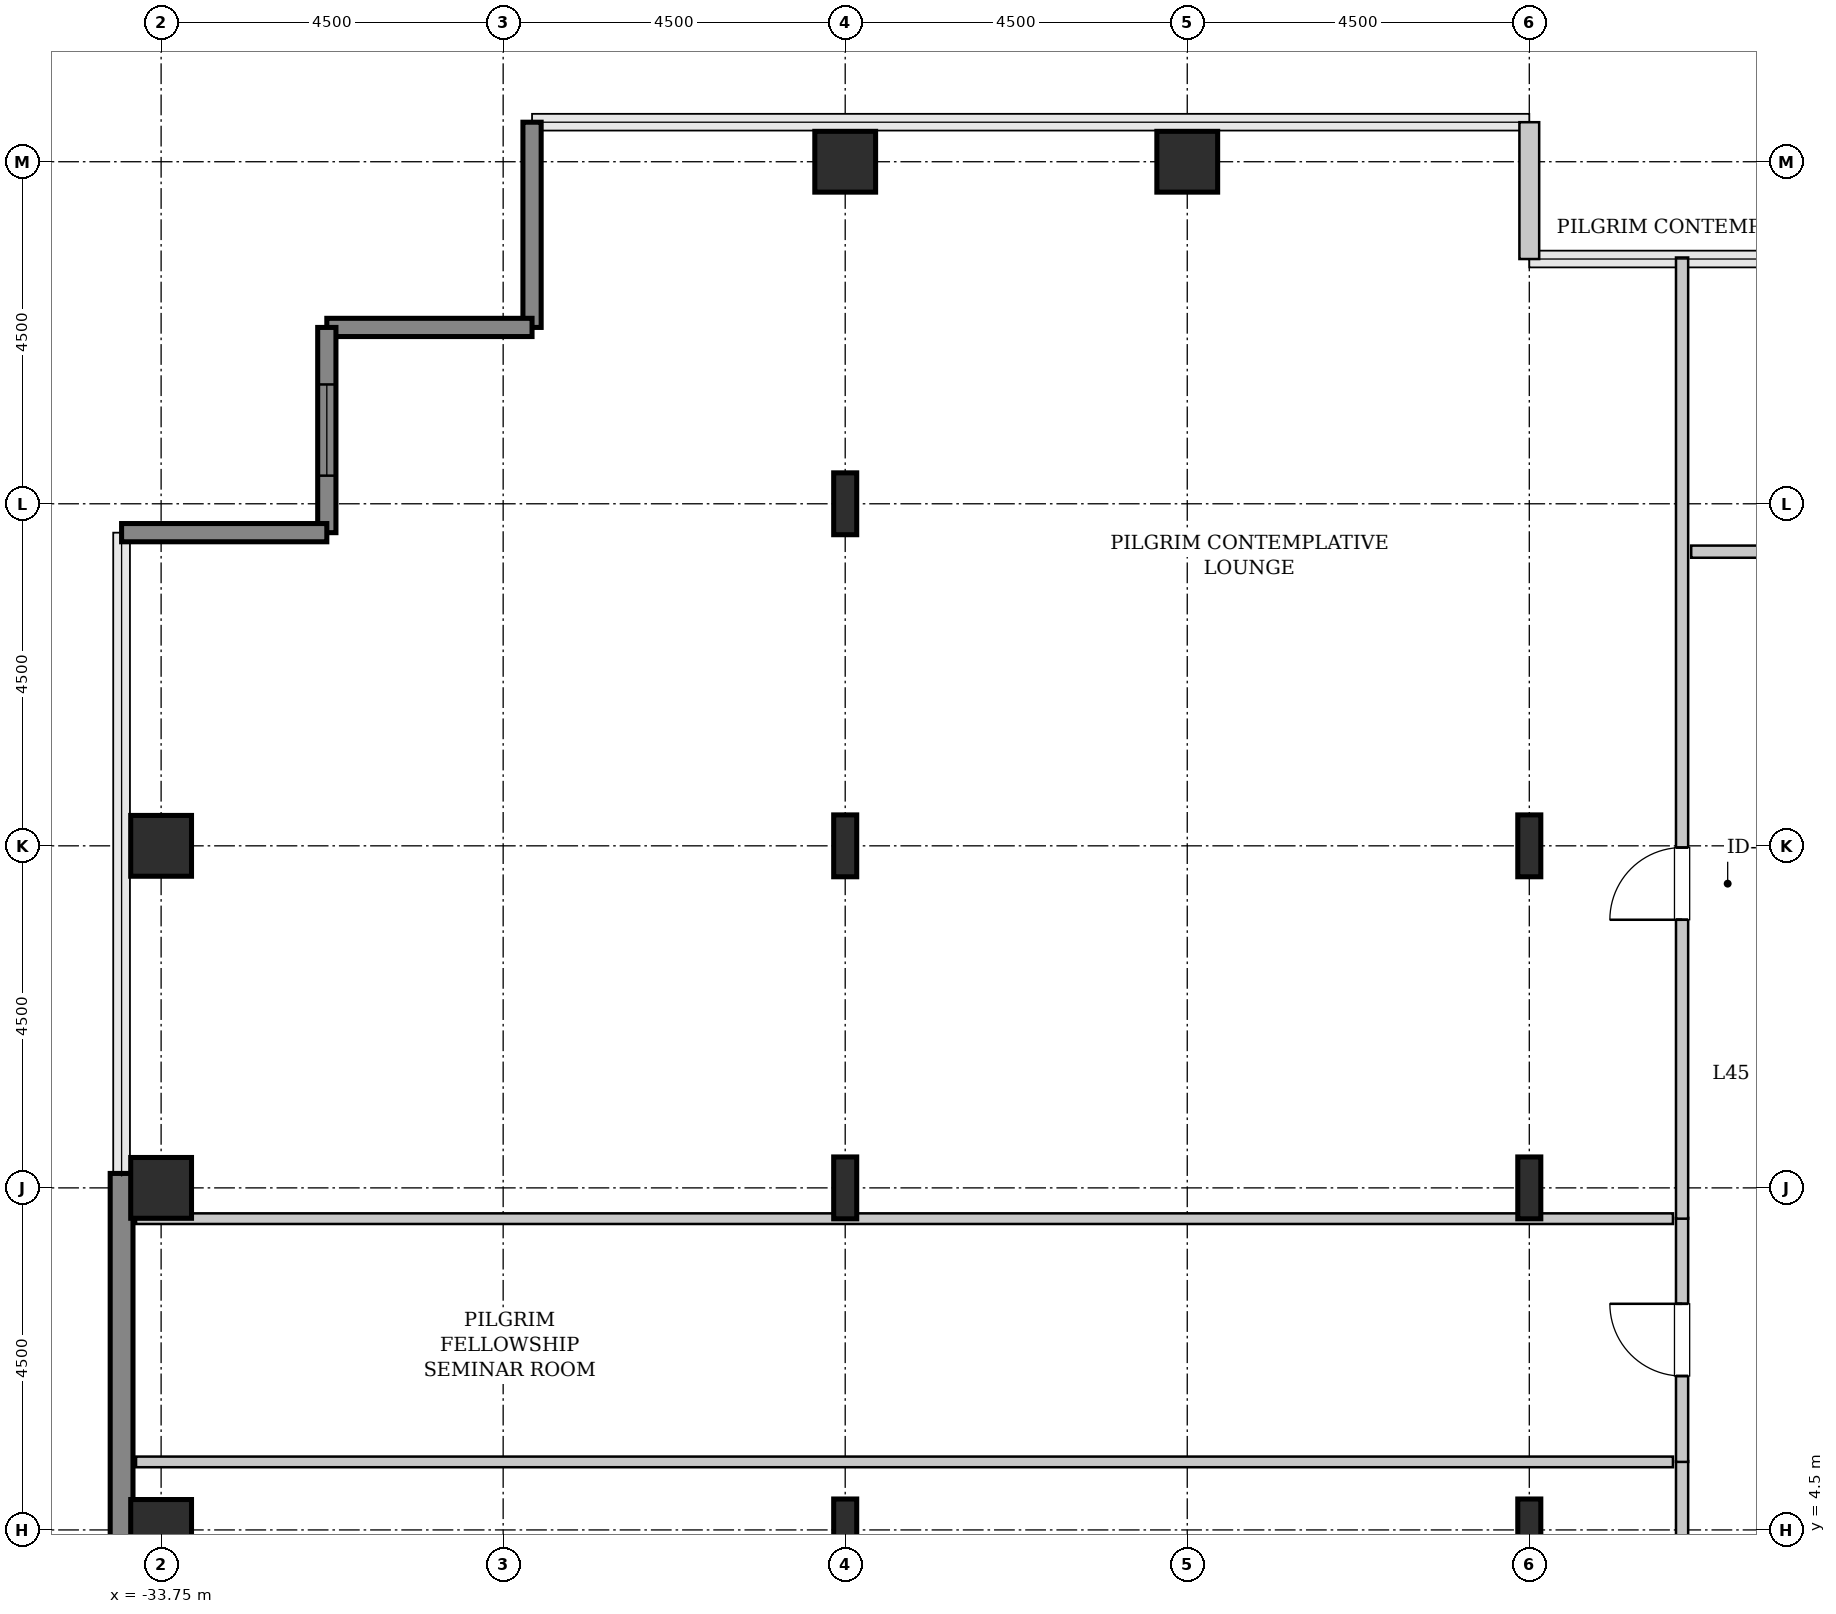
"""IFC4 building model, lengths in metres.
Left out: names, types, materials, properties, quantities, classifications, styles, units other than length and angle.
Written with IfcOpenShell. Run it as: python <this file> out.ifc"""

import sys

from ifc_helpers import new_model, si_unit, direction, frame, frame_2d, origin, origin_2d, place, context, subcontext, project, spatial, rectangle, hollow_rectangle, i_section, extrude, source, transform, mapped, element, fill, save


model = new_model("IFC4")
c1 = context("Model", 3, precision=1e-05, world=origin(), true_north=direction((0.0, 1.0)))
c2 = subcontext(c1, "Body", "Model", "MODEL_VIEW")
j1 = project(units=[si_unit("LENGTHUNIT", "METRE"), si_unit("PLANEANGLEUNIT", "RADIAN")], contexts=[c1])
p1 = place(None, origin())
s1 = spatial("IfcSite", under=j1, at=p1, CompositionType="ELEMENT")
p2 = place(p1, origin())
s2 = spatial("IfcBuilding", under=s1, at=p2, CompositionType="ELEMENT")
p3 = place(p2, frame((0.0, 0.0, 183.0)))
s3 = spatial("IfcBuildingStorey", under=s2, at=p3, CompositionType="ELEMENT", Elevation=183.0)
m1 = source(origin(), c2, "Body", "SweptSolid", [
    extrude(hollow_rectangle(XDim=0.8, YDim=0.8, WallThickness=0.04, InnerFilletRadius=0.04, OuterFilletRadius=0.08, at=origin_2d()), origin(), (0.0, 0.0, 1.0), 3.8),
])
for number, where, z_axis, x_axis in (
    (1, (-33.75, 4.5, 0.0), (0.0, 0.0, 1.0), (1.0, 0.0, 0.0)),
    (2, (-33.75, 9.0, 0.0), (0.0, 0.0, 1.0), (1.0, 0.0, 0.0)),
    (3, (-33.75, 13.5, 0.0), (0.0, 0.0, 1.0), (1.0, 0.0, 0.0)),
):
    element("IfcColumn", number, at=place(p3, frame(where, z_axis=z_axis, x_axis=x_axis)), inside=s3, PredefinedType="COLUMN", context=c2, shape_type="MappedRepresentation", body=[
        mapped(m1, transform((0.0, 0.0, 0.0), x_axis=(1.0, 0.0, 0.0), y_axis=(0.0, 1.0, 0.0), z_axis=(0.0, 0.0, 1.0), scale=1.0)),
    ])
m2 = source(origin(), c2, "Body", "SweptSolid", [
    extrude(i_section(OverallWidth=0.303, OverallDepth=0.814, WebThickness=0.021, FlangeThickness=0.04, FilletRadius=0.03, at=origin_2d()), origin(), (0.0, 0.0, 1.0), 3.8),
])
for number, where, z_axis, x_axis in (
    (4, (-24.75, 4.5, 0.0), (0.0, 0.0, 1.0), (1.0, 0.0, 0.0)),
    (5, (-24.75, 9.0, 0.0), (0.0, 0.0, 1.0), (1.0, 0.0, 0.0)),
    (6, (-24.75, 13.5, 0.0), (0.0, 0.0, 1.0), (1.0, 0.0, 0.0)),
    (7, (-24.75, 18.0, 0.0), (0.0, 0.0, 1.0), (1.0, 0.0, 0.0)),
):
    element("IfcColumn", number, at=place(p3, frame(where, z_axis=z_axis, x_axis=x_axis)), inside=s3, PredefinedType="COLUMN", context=c2, shape_type="MappedRepresentation", body=[
        mapped(m2, transform((0.0, 0.0, 0.0), x_axis=(1.0, 0.0, 0.0), y_axis=(0.0, 1.0, 0.0), z_axis=(0.0, 0.0, 1.0), scale=1.0)),
    ])
for number, where, z_axis, x_axis in (
    (8, (-24.75, 22.5, 0.0), (0.0, 0.0, 1.0), (1.0, 0.0, 0.0)),
    (9, (-20.25, 22.5, 0.0), (0.0, 0.0, 1.0), (1.0, 0.0, 0.0)),
):
    element("IfcColumn", number, at=place(p3, frame(where, z_axis=z_axis, x_axis=x_axis)), inside=s3, PredefinedType="COLUMN", context=c2, shape_type="MappedRepresentation", body=[
        mapped(m1, transform((0.0, 0.0, 0.0), x_axis=(1.0, 0.0, 0.0), y_axis=(0.0, 1.0, 0.0), z_axis=(0.0, 0.0, 1.0), scale=1.0)),
    ])
for number, where, z_axis, x_axis in (
    (10, (-15.75, 4.5, 0.0), (0.0, 0.0, 1.0), (1.0, 0.0, 0.0)),
    (11, (-15.75, 9.0, 0.0), (0.0, 0.0, 1.0), (1.0, 0.0, 0.0)),
    (12, (-15.75, 13.5, 0.0), (0.0, 0.0, 1.0), (1.0, 0.0, 0.0)),
):
    element("IfcColumn", number, at=place(p3, frame(where, z_axis=z_axis, x_axis=x_axis)), inside=s3, PredefinedType="COLUMN", context=c2, shape_type="MappedRepresentation", body=[
        mapped(m2, transform((0.0, 0.0, 0.0), x_axis=(1.0, 0.0, 0.0), y_axis=(0.0, 1.0, 0.0), z_axis=(0.0, 0.0, 1.0), scale=1.0)),
    ])
m3 = source(origin(), c2, "Body", "SweptSolid", [
    extrude(rectangle(XDim=4.88, YDim=0.3, at=frame_2d((2.44, 0.0))), origin(), (0.0, 0.0, 1.0), 3.55),
])
p4 = place(p3, frame((-34.27, 4.31, 0.0), z_axis=(0.0, 0.0, 1.0), x_axis=(0.0, 1.0, 0.0)))
e13 = element("IfcWall", 13, at=p4, inside=s3, PredefinedType="SHEAR", context=c2, shape_type="MappedRepresentation", body=[
    mapped(m3, transform((0.0, 0.0, 0.0), x_axis=(1.0, 0.0, 0.0), y_axis=(0.0, 1.0, 0.0), z_axis=(0.0, 0.0, 1.0), scale=1.0)),
])
m4 = source(origin(), c2, "Body", "SweptSolid", [
    extrude(rectangle(XDim=1.8, YDim=0.26, at=frame_2d((0.9, 0.0))), origin(), (0.0, 0.0, 1.0), 3.55),
])
p5 = place(p3, frame((-15.75, 21.22, 0.0), z_axis=(0.0, 0.0, 1.0), x_axis=(0.0, 1.0, 0.0)))
e14 = element("IfcWall", 14, at=p5, inside=s3, PredefinedType="SOLIDWALL", context=c2, shape_type="MappedRepresentation", body=[
    mapped(m4, transform((0.0, 0.0, 0.0), x_axis=(1.0, 0.0, 0.0), y_axis=(0.0, 1.0, 0.0), z_axis=(0.0, 0.0, 1.0), scale=1.0)),
])
m5 = source(origin(), c2, "Body", "SweptSolid", [
    extrude(rectangle(XDim=2.7, YDim=0.24, at=frame_2d((1.35, 0.0))), origin(), (0.0, 0.0, 1.0), 3.55),
])
for number, where, z_axis, x_axis in (
    (15, (-28.87, 23.02, 0.0), (0.0, 0.0, 1.0), (0.0, -1.0, 0.0)),
    (16, (-28.87, 20.32, 0.0), (0.0, 0.0, 1.0), (-1.0, 0.0, 0.0)),
):
    element("IfcWall", number, at=place(p3, frame(where, z_axis=z_axis, x_axis=x_axis)), inside=s3, PredefinedType="SHEAR", context=c2, shape_type="MappedRepresentation", body=[
        mapped(m5, transform((0.0, 0.0, 0.0), x_axis=(1.0, 0.0, 0.0), y_axis=(0.0, 1.0, 0.0), z_axis=(0.0, 0.0, 1.0), scale=1.0)),
    ])
p6 = place(p3, frame((-31.57, 20.32, 0.0), z_axis=(0.0, 0.0, 1.0), x_axis=(0.0, -1.0, 0.0)))
e17 = element("IfcWall", 17, at=p6, inside=s3, PredefinedType="SHEAR", context=c2, shape_type="MappedRepresentation", body=[
    mapped(m5, transform((0.0, 0.0, 0.0), x_axis=(1.0, 0.0, 0.0), y_axis=(0.0, 1.0, 0.0), z_axis=(0.0, 0.0, 1.0), scale=1.0)),
])
p7 = place(p6, frame((0.75, 0.0, 0.85)))
e18 = element("IfcOpeningElement", 18, at=p7, cuts=e17, PredefinedType="OPENING", context=c2, shape_type="SweptSolid", body=[
    extrude(rectangle(XDim=1.2, YDim=1.8, at=frame_2d((0.6, 0.9))), frame((0.0, 0.13, 0.0), z_axis=(0.0, -1.0, 0.0), x_axis=(1.0, 0.0, 0.0)), (0.0, 0.0, 1.0), 0.26),
])
p8 = place(p3, frame((-31.57, 17.62, 0.0), z_axis=(0.0, 0.0, 1.0), x_axis=(-1.0, 0.0, 0.0)))
e19 = element("IfcWall", 19, at=p8, inside=s3, PredefinedType="SHEAR", context=c2, shape_type="MappedRepresentation", body=[
    mapped(m5, transform((0.0, 0.0, 0.0), x_axis=(1.0, 0.0, 0.0), y_axis=(0.0, 1.0, 0.0), z_axis=(0.0, 0.0, 1.0), scale=1.0)),
])
m6 = source(origin(), c2, "Body", "SweptSolid", [
    extrude(rectangle(XDim=5.41, YDim=0.16, at=frame_2d((2.705, 0.0))), origin(), (0.0, 0.0, 1.0), 3.535),
])
p9 = place(p3, frame((-13.74, -0.005, 0.0), z_axis=(0.0, 0.0, 1.0), x_axis=(0.0, 1.0, 0.0)))
e20 = element("IfcWall", 20, at=p9, inside=s3, PredefinedType="PARTITIONING", context=c2, shape_type="MappedRepresentation", body=[
    mapped(m6, transform((0.0, 0.0, 0.0), x_axis=(1.0, 0.0, 0.0), y_axis=(0.0, 1.0, 0.0), z_axis=(0.0, 0.0, 1.0), scale=1.0)),
])
p10 = place(p9, frame((2.23, 0.0, 0.0)))
e21 = element("IfcOpeningElement", 21, at=p10, cuts=e20, PredefinedType="OPENING", context=c2, shape_type="SweptSolid", body=[
    extrude(rectangle(XDim=0.95, YDim=2.1, at=frame_2d((0.475, 1.05))), frame((0.0, 0.09, 0.0), z_axis=(0.0, -1.0, 0.0), x_axis=(1.0, 0.0, 0.0)), (0.0, 0.0, 1.0), 0.18),
])
m7 = source(origin(), c2, "Body", "SweptSolid", [
    extrude(rectangle(XDim=20.22, YDim=0.14, at=frame_2d((10.11, 0.0))), origin(), (0.0, 0.0, 1.0), 3.535),
])
p11 = place(p3, frame((-34.08, 5.395, 0.0), z_axis=(0.0, 0.0, 1.0), x_axis=(1.0, 0.0, 0.0)))
e22 = element("IfcWall", 22, at=p11, inside=s3, PredefinedType="PARTITIONING", context=c2, shape_type="MappedRepresentation", body=[
    mapped(m7, transform((0.0, 0.0, 0.0), x_axis=(1.0, 0.0, 0.0), y_axis=(0.0, 1.0, 0.0), z_axis=(0.0, 0.0, 1.0), scale=1.0)),
])
m8 = source(origin(), c2, "Body", "SweptSolid", [
    extrude(rectangle(XDim=3.21, YDim=0.16, at=frame_2d((1.605, 0.0))), origin(), (0.0, 0.0, 1.0), 3.535),
])
p12 = place(p3, frame((-13.74, 5.395, 0.0), z_axis=(0.0, 0.0, 1.0), x_axis=(0.0, 1.0, 0.0)))
e23 = element("IfcWall", 23, at=p12, inside=s3, PredefinedType="PARTITIONING", context=c2, shape_type="MappedRepresentation", body=[
    mapped(m8, transform((0.0, 0.0, 0.0), x_axis=(1.0, 0.0, 0.0), y_axis=(0.0, 1.0, 0.0), z_axis=(0.0, 0.0, 1.0), scale=1.0)),
])
p13 = place(p12, frame((1.13, 0.0, 0.0)))
e24 = element("IfcOpeningElement", 24, at=p13, cuts=e23, PredefinedType="OPENING", context=c2, shape_type="SweptSolid", body=[
    extrude(rectangle(XDim=0.95, YDim=2.1, at=frame_2d((0.475, 1.05))), frame((0.0, 0.09, 0.0), z_axis=(0.0, -1.0, 0.0), x_axis=(1.0, 0.0, 0.0)), (0.0, 0.0, 1.0), 0.18),
])
m9 = source(origin(), c2, "Body", "SweptSolid", [
    extrude(rectangle(XDim=20.22, YDim=0.14, at=frame_2d((10.11, 0.0))), origin(), (0.0, 0.0, 1.0), 2.875),
])
p14 = place(p3, frame((-34.08, 8.595, 0.0), z_axis=(0.0, 0.0, 1.0), x_axis=(1.0, 0.0, 0.0)))
e25 = element("IfcWall", 25, at=p14, inside=s3, PredefinedType="PARTITIONING", context=c2, shape_type="MappedRepresentation", body=[
    mapped(m9, transform((0.0, 0.0, 0.0), x_axis=(1.0, 0.0, 0.0), y_axis=(0.0, 1.0, 0.0), z_axis=(0.0, 0.0, 1.0), scale=1.0)),
])
m10 = source(origin(), c2, "Body", "SweptSolid", [
    extrude(rectangle(XDim=12.645, YDim=0.16, at=frame_2d((6.323, 0.0))), origin(), (0.0, 0.0, 1.0), 3.535),
])
p15 = place(p3, frame((-13.74, 8.595, 0.0), z_axis=(0.0, 0.0, 1.0), x_axis=(0.0, 1.0, 0.0)))
e26 = element("IfcWall", 26, at=p15, inside=s3, PredefinedType="PARTITIONING", context=c2, shape_type="MappedRepresentation", body=[
    mapped(m10, transform((0.0, 0.0, 0.0), x_axis=(1.0, 0.0, 0.0), y_axis=(0.0, 1.0, 0.0), z_axis=(0.0, 0.0, 1.0), scale=1.0)),
])
p16 = place(p15, frame((3.933, 0.0, 0.0)))
e27 = element("IfcOpeningElement", 27, at=p16, cuts=e26, PredefinedType="OPENING", context=c2, shape_type="SweptSolid", body=[
    extrude(rectangle(XDim=0.95, YDim=2.1, at=frame_2d((0.475, 1.05))), frame((0.0, 0.09, 0.0), z_axis=(0.0, -1.0, 0.0), x_axis=(1.0, 0.0, 0.0)), (0.0, 0.0, 1.0), 0.18),
])
m11 = source(origin(), c2, "Body", "SweptSolid", [
    extrude(rectangle(XDim=4.16, YDim=0.16, at=frame_2d((2.08, 0.0))), origin(), (0.0, 0.0, 1.0), 3.535),
])
p17 = place(p3, frame((-13.62, 17.37, 0.0), z_axis=(0.0, 0.0, 1.0), x_axis=(1.0, 0.0, 0.0)))
e28 = element("IfcWall", 28, at=p17, inside=s3, PredefinedType="PARTITIONING", context=c2, shape_type="MappedRepresentation", body=[
    mapped(m11, transform((0.0, 0.0, 0.0), x_axis=(1.0, 0.0, 0.0), y_axis=(0.0, 1.0, 0.0), z_axis=(0.0, 0.0, 1.0), scale=1.0)),
])
p18 = place(p17, frame((0.969, 0.0, 0.0)))
e29 = element("IfcOpeningElement", 29, at=p18, cuts=e28, PredefinedType="OPENING", context=c2, shape_type="SweptSolid", body=[
    extrude(rectangle(XDim=0.95, YDim=2.1, at=frame_2d((0.475, 1.05))), frame((0.0, 0.09, 0.0), z_axis=(0.0, -1.0, 0.0), x_axis=(1.0, 0.0, 0.0)), (0.0, 0.0, 1.0), 0.18),
])
m12 = source(origin(), c2, "Body", "SweptSolid", [
    extrude(rectangle(XDim=1.2, YDim=1.8, at=frame_2d((0.6, 0.9))), frame((0.0, 0.03, 0.0), z_axis=(0.0, -1.0, 0.0), x_axis=(1.0, 0.0, 0.0)), (0.0, 0.0, 1.0), 0.06),
])
p19 = place(p7, origin())
e30 = element("IfcWindow", 30, at=p19, inside=s3, PartitioningType="SINGLE_PANEL", PredefinedType="WINDOW", context=c2, shape_type="MappedRepresentation", body=[
    mapped(m12, transform((0.0, 0.0, 0.0), x_axis=(1.0, 0.0, 0.0), y_axis=(0.0, 1.0, 0.0), z_axis=(0.0, 0.0, 1.0), scale=1.0)),
])
fill(e18, e30)
m13 = source(origin(), c2, "Body", "SweptSolid", [
    extrude(rectangle(XDim=0.95, YDim=2.1, at=frame_2d((0.475, 1.05))), frame((0.0, 0.025, 0.0), z_axis=(0.0, -1.0, 0.0), x_axis=(1.0, 0.0, 0.0)), (0.0, 0.0, 1.0), 0.05),
])
p20 = place(p13, origin())
e31 = element("IfcDoor", 31, at=p20, inside=s3, OperationType="SINGLE_SWING_RIGHT", PredefinedType="DOOR", context=c2, shape_type="MappedRepresentation", body=[
    mapped(m13, transform((0.0, 0.0, 0.0), x_axis=(1.0, 0.0, 0.0), y_axis=(0.0, 1.0, 0.0), z_axis=(0.0, 0.0, 1.0), scale=1.0)),
])
fill(e24, e31)
p21 = place(p16, origin())
e32 = element("IfcDoor", 32, at=p21, inside=s3, OperationType="SINGLE_SWING_LEFT", PredefinedType="DOOR", context=c2, shape_type="MappedRepresentation", body=[
    mapped(m13, transform((0.0, 0.0, 0.0), x_axis=(1.0, 0.0, 0.0), y_axis=(0.0, 1.0, 0.0), z_axis=(0.0, 0.0, 1.0), scale=1.0)),
])
fill(e27, e32)
save(model, sys.argv[1])
